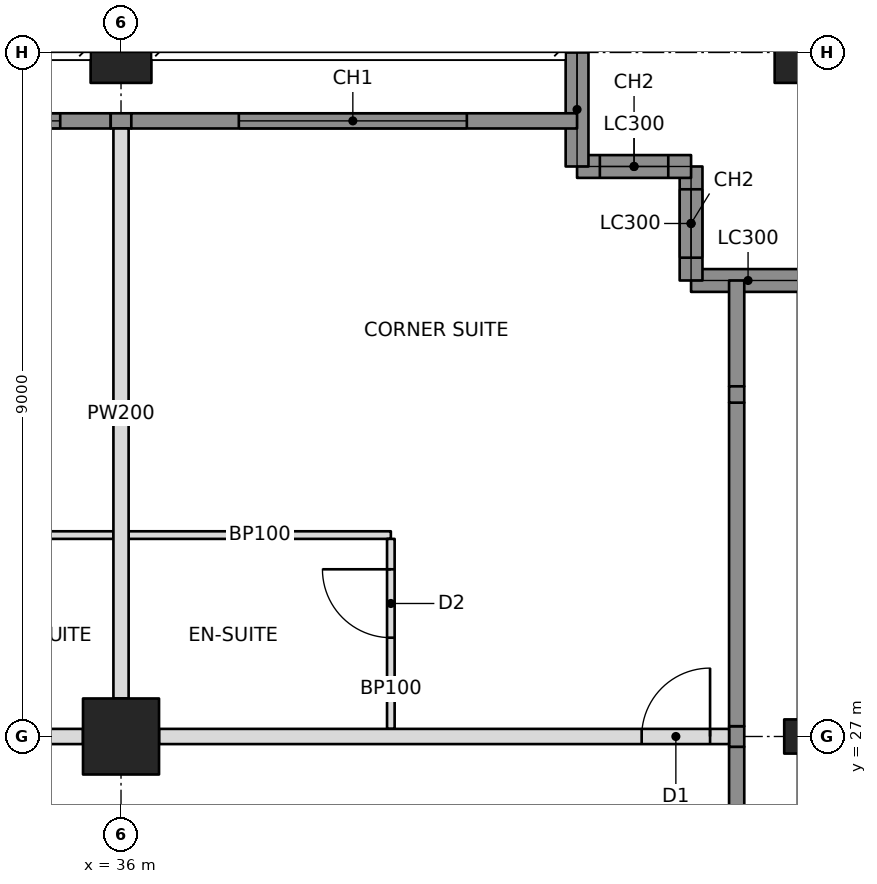
"""IFC4 building model, lengths in metres.
Left out: names, types, materials, properties, quantities, classifications, styles, units other than length and angle.
Written with IfcOpenShell. Run it as: python <this file> out.ifc"""

import sys

from ifc_helpers import new_model, si_unit, direction, frame, frame_2d, origin, origin_2d, place, context, subcontext, project, spatial, rectangle, hollow_rectangle, i_section, extrude, element, fill, save


model = new_model("IFC4")
c1 = context("Model", 3, precision=1e-05, world=origin(), true_north=direction((0.0, 1.0)))
c2 = subcontext(c1, "Body", "Model", "MODEL_VIEW")
j1 = project(units=[si_unit("LENGTHUNIT", "METRE"), si_unit("PLANEANGLEUNIT", "RADIAN")], contexts=[c1])
p1 = place(None, origin())
s1 = spatial("IfcSite", under=j1, at=p1, CompositionType="ELEMENT")
p2 = place(p1, origin())
s2 = spatial("IfcBuilding", under=s1, at=p2, CompositionType="ELEMENT")
p3 = place(p2, frame((0.0, 0.0, 97.6)))
s3 = spatial("IfcBuildingStorey", under=s2, at=p3, CompositionType="ELEMENT", Elevation=97.6)
p4 = place(p3, frame((36.0, 27.0, 0.0), z_axis=(0.0, 0.0, 1.0), x_axis=(1.0, 0.0, 0.0)))
e1 = element("IfcColumn", 1, at=p4, inside=s3, PredefinedType="COLUMN", context=c2, shape_type="SweptSolid", body=[
    extrude(hollow_rectangle(XDim=1.0, YDim=1.0, WallThickness=0.1, at=origin_2d()), origin(), (0.0, 0.0, 1.0), 3.4),
])
p5 = place(p3, frame((36.0, 36.0, 0.0), z_axis=(0.0, 0.0, 1.0), x_axis=(1.0, 0.0, 0.0)))
e2 = element("IfcColumn", 2, at=p5, inside=s3, PredefinedType="COLUMN", context=c2, shape_type="SweptSolid", body=[
    extrude(hollow_rectangle(XDim=0.8, YDim=0.8, WallThickness=0.07, at=origin_2d()), origin(), (0.0, 0.0, 1.0), 3.4),
])
p6 = place(p3, frame((45.0, 27.0, 0.0), z_axis=(0.0, 0.0, 1.0), x_axis=(0.0, 1.0, 0.0)))
e3 = element("IfcColumn", 3, at=p6, inside=s3, PredefinedType="COLUMN", context=c2, shape_type="SweptSolid", body=[
    extrude(i_section(OverallWidth=0.449, OverallDepth=0.549, WebThickness=0.072, FlangeThickness=0.115, at=origin_2d()), origin(), (0.0, 0.0, 1.0), 3.4),
])
p7 = place(p3, frame((45.0, 36.0, 0.0), z_axis=(0.0, 0.0, 1.0), x_axis=(1.0, 0.0, 0.0)))
e4 = element("IfcColumn", 4, at=p7, inside=s3, PredefinedType="COLUMN", context=c2, shape_type="SweptSolid", body=[
    extrude(hollow_rectangle(XDim=0.8, YDim=0.8, WallThickness=0.07, at=origin_2d()), origin(), (0.0, 0.0, 1.0), 3.4),
])
p8 = place(p3, frame((45.0, 33.0, 0.0), z_axis=(0.0, 0.0, 1.0), x_axis=(-1.0, 0.0, 0.0)))
e5 = element("IfcWall", 5, at=p8, inside=s3, PredefinedType="SOLIDWALL", context=c2, shape_type="SweptSolid", body=[
    extrude(rectangle(XDim=1.5, YDim=0.3, at=frame_2d((0.75, 0.0))), origin(), (0.0, 0.0, 1.0), 2.42),
])
p9 = place(p3, frame((43.5, 33.0, 0.0), z_axis=(0.0, 0.0, 1.0), x_axis=(0.0, 1.0, 0.0)))
e6 = element("IfcWall", 6, at=p9, inside=s3, PredefinedType="SOLIDWALL", context=c2, shape_type="SweptSolid", body=[
    extrude(rectangle(XDim=1.5, YDim=0.3, at=frame_2d((0.75, 0.0))), origin(), (0.0, 0.0, 1.0), 3.2),
])
p10 = place(p9, frame((0.3, 0.0, 0.6)))
e7 = element("IfcOpeningElement", 7, at=p10, cuts=e6, PredefinedType="OPENING", context=c2, shape_type="SweptSolid", body=[
    extrude(rectangle(XDim=0.9, YDim=2.2, at=frame_2d((0.45, 1.1))), frame((0.0, 0.16, 0.0), z_axis=(0.0, -1.0, 0.0), x_axis=(1.0, 0.0, 0.0)), (0.0, 0.0, 1.0), 0.32),
])
p11 = place(p3, frame((43.5, 34.5, 0.0), z_axis=(0.0, 0.0, 1.0), x_axis=(-1.0, 0.0, 0.0)))
e8 = element("IfcWall", 8, at=p11, inside=s3, PredefinedType="SOLIDWALL", context=c2, shape_type="SweptSolid", body=[
    extrude(rectangle(XDim=1.5, YDim=0.3, at=frame_2d((0.75, 0.0))), origin(), (0.0, 0.0, 1.0), 3.2),
])
p12 = place(p11, frame((0.3, 0.0, 0.6)))
e9 = element("IfcOpeningElement", 9, at=p12, cuts=e8, PredefinedType="OPENING", context=c2, shape_type="SweptSolid", body=[
    extrude(rectangle(XDim=0.9, YDim=2.2, at=frame_2d((0.45, 1.1))), frame((0.0, 0.16, 0.0), z_axis=(0.0, -1.0, 0.0), x_axis=(1.0, 0.0, 0.0)), (0.0, 0.0, 1.0), 0.32),
])
p13 = place(p3, frame((42.0, 34.5, 0.0), z_axis=(0.0, 0.0, 1.0), x_axis=(0.0, 1.0, 0.0)))
e10 = element("IfcWall", 10, at=p13, inside=s3, PredefinedType="SOLIDWALL", context=c2, shape_type="SweptSolid", body=[
    extrude(rectangle(XDim=1.5, YDim=0.3, at=frame_2d((0.75, 0.0))), origin(), (0.0, 0.0, 1.0), 2.42),
])
p14 = place(p3, frame((27.5, 27.0, 0.0), z_axis=(0.0, 0.0, 1.0), x_axis=(1.0, 0.0, 0.0)))
e11 = element("IfcWall", 11, at=p14, inside=s3, PredefinedType="PARTITIONING", context=c2, shape_type="SweptSolid", body=[
    extrude(rectangle(XDim=8.0, YDim=0.2, at=frame_2d((4.0, 0.0))), origin(), (0.0, 0.0, 1.0), 2.405),
])
p15 = place(p14, frame((4.25, 0.0, 0.0)))
e12 = element("IfcOpeningElement", 12, at=p15, cuts=e11, PredefinedType="OPENING", context=c2, shape_type="SweptSolid", body=[
    extrude(rectangle(XDim=0.9, YDim=2.1, at=frame_2d((0.45, 1.05))), frame((0.0, 0.11, 0.0), z_axis=(0.0, -1.0, 0.0), x_axis=(1.0, 0.0, 0.0)), (0.0, 0.0, 1.0), 0.22),
])
p16 = place(p3, frame((36.5, 27.0, 0.0), z_axis=(0.0, 0.0, 1.0), x_axis=(1.0, 0.0, 0.0)))
e13 = element("IfcWall", 13, at=p16, inside=s3, PredefinedType="PARTITIONING", context=c2, shape_type="SweptSolid", body=[
    extrude(rectangle(XDim=7.5, YDim=0.2, at=frame_2d((3.75, 0.0))), origin(), (0.0, 0.0, 1.0), 2.438),
])
p17 = place(p16, frame((6.35, 0.0, 0.0)))
e14 = element("IfcOpeningElement", 14, at=p17, cuts=e13, PredefinedType="OPENING", context=c2, shape_type="SweptSolid", body=[
    extrude(rectangle(XDim=0.9, YDim=2.1, at=frame_2d((0.45, 1.05))), frame((0.0, 0.11, 0.0), z_axis=(0.0, -1.0, 0.0), x_axis=(1.0, 0.0, 0.0)), (0.0, 0.0, 1.0), 0.22),
])
p18 = place(p3, frame((36.0, 27.5, 0.0), z_axis=(0.0, 0.0, 1.0), x_axis=(0.0, 1.0, 0.0)))
e15 = element("IfcWall", 15, at=p18, inside=s3, PredefinedType="PARTITIONING", context=c2, shape_type="SweptSolid", body=[
    extrude(rectangle(XDim=7.5, YDim=0.2, at=frame_2d((3.75, 0.0))), origin(), (0.0, 0.0, 1.0), 2.438),
])
p19 = place(p3, frame((32.95, 29.65, 0.0), z_axis=(0.0, 0.0, 1.0), x_axis=(1.0, 0.0, 0.0)))
e16 = element("IfcWall", 16, at=p19, inside=s3, PredefinedType="PARTITIONING", context=c2, shape_type="SweptSolid", body=[
    extrude(rectangle(XDim=2.95, YDim=0.1, at=frame_2d((1.475, 0.0))), origin(), (0.0, 0.0, 1.0), 2.438),
])
p20 = place(p3, frame((36.1, 29.65, 0.0), z_axis=(0.0, 0.0, 1.0), x_axis=(1.0, 0.0, 0.0)))
e17 = element("IfcWall", 17, at=p20, inside=s3, PredefinedType="PARTITIONING", context=c2, shape_type="SweptSolid", body=[
    extrude(rectangle(XDim=3.45, YDim=0.1, at=frame_2d((1.725, 0.0))), origin(), (0.0, 0.0, 1.0), 2.438),
])
p21 = place(p3, frame((39.55, 27.1, 0.0), z_axis=(0.0, 0.0, 1.0), x_axis=(0.0, 1.0, 0.0)))
e18 = element("IfcWall", 18, at=p21, inside=s3, PredefinedType="PARTITIONING", context=c2, shape_type="SweptSolid", body=[
    extrude(rectangle(XDim=2.5, YDim=0.1, at=frame_2d((1.25, 0.0))), origin(), (0.0, 0.0, 1.0), 2.438),
])
p22 = place(p21, frame((1.2, 0.0, 0.0)))
e19 = element("IfcOpeningElement", 19, at=p22, cuts=e18, PredefinedType="OPENING", context=c2, shape_type="SweptSolid", body=[
    extrude(rectangle(XDim=0.9, YDim=2.1, at=frame_2d((0.45, 1.05))), frame((0.0, 0.06, 0.0), z_axis=(0.0, -1.0, 0.0), x_axis=(1.0, 0.0, 0.0)), (0.0, 0.0, 1.0), 0.12),
])
p23 = place(p3, frame((27.194, 35.1, 0.0), z_axis=(0.0, 0.0, 1.0), x_axis=(1.0, 0.0, 0.0)))
e20 = element("IfcWall", 20, at=p23, inside=s3, PredefinedType="SOLIDWALL", context=c2, shape_type="SweptSolid", body=[
    extrude(rectangle(XDim=8.671, YDim=0.2, at=frame_2d((4.335, 0.0))), origin(), (0.0, 0.0, 1.0), 3.2),
])
p24 = place(p23, frame((0.606, 0.0, 0.6)))
e21 = element("IfcOpeningElement", 21, at=p24, cuts=e20, PredefinedType="OPENING", context=c2, shape_type="SweptSolid", body=[
    extrude(rectangle(XDim=3.0, YDim=2.2, at=frame_2d((1.5, 1.1))), frame((0.0, 0.11, 0.0), z_axis=(0.0, -1.0, 0.0), x_axis=(1.0, 0.0, 0.0)), (0.0, 0.0, 1.0), 0.22),
])
p25 = place(p23, frame((5.006, 0.0, 0.6)))
e22 = element("IfcOpeningElement", 22, at=p25, cuts=e20, PredefinedType="OPENING", context=c2, shape_type="SweptSolid", body=[
    extrude(rectangle(XDim=3.0, YDim=2.2, at=frame_2d((1.5, 1.1))), frame((0.0, 0.11, 0.0), z_axis=(0.0, -1.0, 0.0), x_axis=(1.0, 0.0, 0.0)), (0.0, 0.0, 1.0), 0.22),
])
p26 = place(p3, frame((35.865, 35.1, 0.0), z_axis=(0.0, 0.0, 1.0), x_axis=(1.0, 0.0, 0.0)))
e23 = element("IfcWall", 23, at=p26, inside=s3, PredefinedType="SOLIDWALL", context=c2, shape_type="SweptSolid", body=[
    extrude(rectangle(XDim=0.271, YDim=0.2, at=frame_2d((0.135, 0.0))), origin(), (0.0, 0.0, 1.0), 2.438),
])
p27 = place(p3, frame((36.135, 35.1, 0.0), z_axis=(0.0, 0.0, 1.0), x_axis=(1.0, 0.0, 0.0)))
e24 = element("IfcWall", 24, at=p27, inside=s3, PredefinedType="SOLIDWALL", context=c2, shape_type="SweptSolid", body=[
    extrude(rectangle(XDim=5.865, YDim=0.2, at=frame_2d((2.932, 0.0))), origin(), (0.0, 0.0, 1.0), 3.2),
])
p28 = place(p27, frame((1.415, 0.0, 0.6)))
e25 = element("IfcOpeningElement", 25, at=p28, cuts=e24, PredefinedType="OPENING", context=c2, shape_type="SweptSolid", body=[
    extrude(rectangle(XDim=3.0, YDim=2.2, at=frame_2d((1.5, 1.1))), frame((0.0, 0.11, 0.0), z_axis=(0.0, -1.0, 0.0), x_axis=(1.0, 0.0, 0.0)), (0.0, 0.0, 1.0), 0.22),
])
p29 = place(p3, frame((44.1, 18.194, 0.0), z_axis=(0.0, 0.0, 1.0), x_axis=(0.0, 1.0, 0.0)))
e26 = element("IfcWall", 26, at=p29, inside=s3, PredefinedType="SOLIDWALL", context=c2, shape_type="SweptSolid", body=[
    extrude(rectangle(XDim=8.671, YDim=0.2, at=frame_2d((4.335, 0.0))), origin(), (0.0, 0.0, 1.0), 3.2),
])
p30 = place(p29, frame((0.156, 0.0, 0.6)))
e27 = element("IfcOpeningElement", 27, at=p30, cuts=e26, PredefinedType="OPENING", context=c2, shape_type="SweptSolid", body=[
    extrude(rectangle(XDim=3.0, YDim=2.2, at=frame_2d((1.5, 1.1))), frame((0.0, 0.11, 0.0), z_axis=(0.0, -1.0, 0.0), x_axis=(1.0, 0.0, 0.0)), (0.0, 0.0, 1.0), 0.22),
])
p31 = place(p29, frame((3.656, 0.0, 0.6)))
e28 = element("IfcOpeningElement", 28, at=p31, cuts=e26, PredefinedType="OPENING", context=c2, shape_type="SweptSolid", body=[
    extrude(rectangle(XDim=3.0, YDim=2.2, at=frame_2d((1.5, 1.1))), frame((0.0, 0.11, 0.0), z_axis=(0.0, -1.0, 0.0), x_axis=(1.0, 0.0, 0.0)), (0.0, 0.0, 1.0), 0.22),
])
p32 = place(p3, frame((44.1, 26.865, 0.0), z_axis=(0.0, 0.0, 1.0), x_axis=(0.0, 1.0, 0.0)))
e29 = element("IfcWall", 29, at=p32, inside=s3, PredefinedType="SOLIDWALL", context=c2, shape_type="SweptSolid", body=[
    extrude(rectangle(XDim=0.271, YDim=0.2, at=frame_2d((0.135, 0.0))), origin(), (0.0, 0.0, 1.0), 2.438),
])
p33 = place(p3, frame((44.1, 27.135, 0.0), z_axis=(0.0, 0.0, 1.0), x_axis=(0.0, 1.0, 0.0)))
e30 = element("IfcWall", 30, at=p33, inside=s3, PredefinedType="SOLIDWALL", context=c2, shape_type="SweptSolid", body=[
    extrude(rectangle(XDim=4.257, YDim=0.2, at=frame_2d((2.129, 0.0))), origin(), (0.0, 0.0, 1.0), 3.2),
])
p34 = place(p3, frame((44.1, 31.393, 0.0), z_axis=(0.0, 0.0, 1.0), x_axis=(0.0, 1.0, 0.0)))
e31 = element("IfcWall", 31, at=p34, inside=s3, PredefinedType="SOLIDWALL", context=c2, shape_type="SweptSolid", body=[
    extrude(rectangle(XDim=0.215, YDim=0.2, at=frame_2d((0.107, 0.0))), origin(), (0.0, 0.0, 1.0), 2.661),
])
p35 = place(p3, frame((44.1, 31.607, 0.0), z_axis=(0.0, 0.0, 1.0), x_axis=(0.0, 1.0, 0.0)))
e32 = element("IfcWall", 32, at=p35, inside=s3, PredefinedType="SOLIDWALL", context=c2, shape_type="SweptSolid", body=[
    extrude(rectangle(XDim=1.393, YDim=0.2, at=frame_2d((0.696, 0.0))), origin(), (0.0, 0.0, 1.0), 3.2),
])
p36 = place(p10, origin())
e33 = element("IfcWindow", 33, at=p36, inside=s3, PartitioningType="SINGLE_PANEL", PredefinedType="WINDOW", context=c2, shape_type="SweptSolid", body=[
    extrude(rectangle(XDim=0.9, YDim=2.2, at=frame_2d((0.45, 1.1))), frame((0.0, 0.03, 0.0), z_axis=(0.0, -1.0, 0.0), x_axis=(1.0, 0.0, 0.0)), (0.0, 0.0, 1.0), 0.06),
])
fill(e7, e33)
p37 = place(p12, origin())
e34 = element("IfcWindow", 34, at=p37, inside=s3, PartitioningType="SINGLE_PANEL", PredefinedType="WINDOW", context=c2, shape_type="SweptSolid", body=[
    extrude(rectangle(XDim=0.9, YDim=2.2, at=frame_2d((0.45, 1.1))), frame((0.0, 0.03, 0.0), z_axis=(0.0, -1.0, 0.0), x_axis=(1.0, 0.0, 0.0)), (0.0, 0.0, 1.0), 0.06),
])
fill(e9, e34)
p38 = place(p25, origin())
e35 = element("IfcWindow", 35, at=p38, inside=s3, PartitioningType="TRIPLE_PANEL_VERTICAL", PredefinedType="WINDOW", context=c2, shape_type="SweptSolid", body=[
    extrude(rectangle(XDim=3.0, YDim=2.2, at=frame_2d((1.5, 1.1))), frame((0.0, 0.03, 0.0), z_axis=(0.0, -1.0, 0.0), x_axis=(1.0, 0.0, 0.0)), (0.0, 0.0, 1.0), 0.06),
])
fill(e22, e35)
p39 = place(p28, origin())
e36 = element("IfcWindow", 36, at=p39, inside=s3, PartitioningType="TRIPLE_PANEL_VERTICAL", PredefinedType="WINDOW", context=c2, shape_type="SweptSolid", body=[
    extrude(rectangle(XDim=3.0, YDim=2.2, at=frame_2d((1.5, 1.1))), frame((0.0, 0.03, 0.0), z_axis=(0.0, -1.0, 0.0), x_axis=(1.0, 0.0, 0.0)), (0.0, 0.0, 1.0), 0.06),
])
fill(e25, e36)
p40 = place(p22, origin())
e37 = element("IfcDoor", 37, at=p40, inside=s3, OperationType="SINGLE_SWING_RIGHT", PredefinedType="DOOR", context=c2, shape_type="SweptSolid", body=[
    extrude(rectangle(XDim=0.9, YDim=2.1, at=frame_2d((0.45, 1.05))), frame((0.0, 0.025, 0.0), z_axis=(0.0, -1.0, 0.0), x_axis=(1.0, 0.0, 0.0)), (0.0, 0.0, 1.0), 0.05),
])
fill(e19, e37)
p41 = place(p17, origin())
e38 = element("IfcDoor", 38, at=p41, inside=s3, OperationType="SINGLE_SWING_RIGHT", PredefinedType="DOOR", context=c2, shape_type="SweptSolid", body=[
    extrude(rectangle(XDim=0.9, YDim=2.1, at=frame_2d((0.45, 1.05))), frame((0.0, 0.025, 0.0), z_axis=(0.0, -1.0, 0.0), x_axis=(1.0, 0.0, 0.0)), (0.0, 0.0, 1.0), 0.05),
])
fill(e14, e38)
save(model, sys.argv[1])
